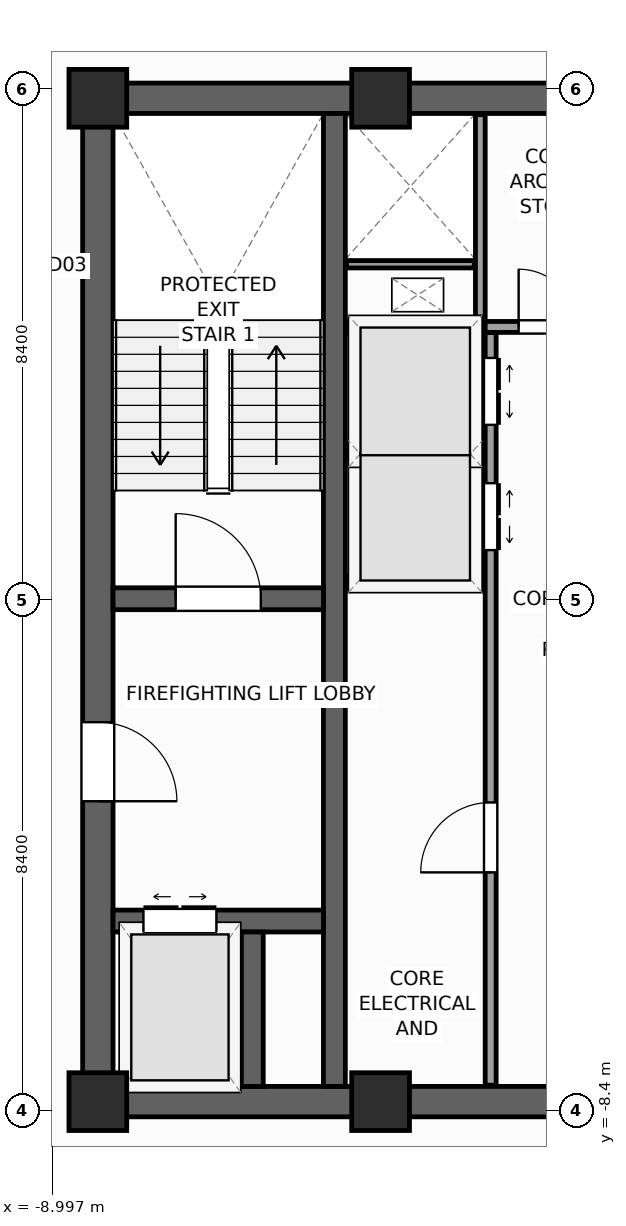
"""IFC4 building model, lengths in metres.
Left out: names, types, materials, properties, quantities, classifications, styles, units other than length and angle.
Written with IfcOpenShell. Run it as: python <this file> out.ifc"""

import sys

from ifc_helpers import new_model, si_unit, direction, frame, frame_2d, origin, origin_2d, place, context, subcontext, project, spatial, rectangle, extrude, source, transform, mapped, element, fill, save


model = new_model("IFC4")
c1 = context("Model", 3, precision=1e-05, world=origin(), true_north=direction((0.0, 1.0)))
c2 = subcontext(c1, "Body", "Model", "MODEL_VIEW")
j1 = project(units=[si_unit("LENGTHUNIT", "METRE"), si_unit("PLANEANGLEUNIT", "RADIAN")], contexts=[c1])
p1 = place(None, origin())
s1 = spatial("IfcSite", under=j1, at=p1, CompositionType="ELEMENT")
p2 = place(p1, origin())
s2 = spatial("IfcBuilding", under=s1, at=p2, CompositionType="ELEMENT")
p3 = place(p2, frame((0.0, 0.0, 248.5)))
s3 = spatial("IfcBuildingStorey", under=s2, at=p3, CompositionType="ELEMENT", Elevation=248.5)
p4 = place(p3, frame((-8.5, -8.25, 0.0), z_axis=(0.0, 0.0, 1.0), x_axis=(1.0, 0.0, 0.0)))
e1 = element("IfcWall", 1, at=p4, inside=s3, PredefinedType="SHEAR", context=c2, shape_type="SweptSolid", body=[
    extrude(rectangle(XDim=17.0, YDim=0.5, at=frame_2d((8.5, 0.0))), origin(), (0.0, 0.0, 1.0), 3.9),
])
p5 = place(p4, frame((7.85, 0.0, 0.0)))
e2 = element("IfcOpeningElement", 2, at=p5, cuts=e1, PredefinedType="OPENING", context=c2, shape_type="SweptSolid", body=[
    extrude(rectangle(XDim=1.3, YDim=2.2, at=frame_2d((0.65, 1.1))), frame((0.0, 0.26, 0.0), z_axis=(0.0, -1.0, 0.0), x_axis=(1.0, 0.0, 0.0)), (0.0, 0.0, 1.0), 0.52),
])
p6 = place(p3, frame((-8.5, 8.25, 0.0), z_axis=(0.0, 0.0, 1.0), x_axis=(1.0, 0.0, 0.0)))
e3 = element("IfcWall", 3, at=p6, inside=s3, PredefinedType="SHEAR", context=c2, shape_type="SweptSolid", body=[
    extrude(rectangle(XDim=17.0, YDim=0.5, at=frame_2d((8.5, 0.0))), origin(), (0.0, 0.0, 1.0), 3.9),
])
p7 = place(p3, frame((-8.25, -8.0, 0.0), z_axis=(0.0, 0.0, 1.0), x_axis=(0.0, 1.0, 0.0)))
e4 = element("IfcWall", 4, at=p7, inside=s3, PredefinedType="SHEAR", context=c2, shape_type="SweptSolid", body=[
    extrude(rectangle(XDim=16.0, YDim=0.5, at=frame_2d((8.0, 0.0))), origin(), (0.0, 0.0, 1.0), 3.9),
])
p8 = place(p7, frame((4.69, 0.0, 0.0)))
e5 = element("IfcOpeningElement", 5, at=p8, cuts=e4, PredefinedType="OPENING", context=c2, shape_type="SweptSolid", body=[
    extrude(rectangle(XDim=1.3, YDim=2.2, at=frame_2d((0.65, 1.1))), frame((0.0, 0.26, 0.0), z_axis=(0.0, -1.0, 0.0), x_axis=(1.0, 0.0, 0.0)), (0.0, 0.0, 1.0), 0.52),
])
p9 = place(p3, frame((-4.36, -8.0, 0.0), z_axis=(0.0, 0.0, 1.0), x_axis=(0.0, 1.0, 0.0)))
e6 = element("IfcWall", 6, at=p9, inside=s3, PredefinedType="SHEAR", context=c2, shape_type="SweptSolid", body=[
    extrude(rectangle(XDim=16.0, YDim=0.36, at=frame_2d((8.0, 0.0))), origin(), (0.0, 0.0, 1.0), 3.9),
])
p10 = place(p3, frame((-8.0, 0.02, 0.0), z_axis=(0.0, 0.0, 1.0), x_axis=(1.0, 0.0, 0.0)))
e7 = element("IfcWall", 7, at=p10, inside=s3, PredefinedType="SHEAR", context=c2, shape_type="SweptSolid", body=[
    extrude(rectangle(XDim=3.46, YDim=0.36, at=frame_2d((1.73, 0.0))), origin(), (0.0, 0.0, 1.0), 3.9),
])
p11 = place(p10, frame((1.03, 0.0, 0.0)))
e8 = element("IfcOpeningElement", 8, at=p11, cuts=e7, PredefinedType="OPENING", context=c2, shape_type="SweptSolid", body=[
    extrude(rectangle(XDim=1.4, YDim=2.2, at=frame_2d((0.7, 1.1))), frame((0.0, 0.19, 0.0), z_axis=(0.0, -1.0, 0.0), x_axis=(1.0, 0.0, 0.0)), (0.0, 0.0, 1.0), 0.38),
])
p12 = place(p3, frame((-8.0, -5.28, 0.0), z_axis=(0.0, 0.0, 1.0), x_axis=(1.0, 0.0, 0.0)))
e9 = element("IfcWall", 9, at=p12, inside=s3, PredefinedType="SHEAR", context=c2, shape_type="SweptSolid", body=[
    extrude(rectangle(XDim=3.46, YDim=0.36, at=frame_2d((1.73, 0.0))), origin(), (0.0, 0.0, 1.0), 3.9),
])
p13 = place(p12, frame((0.5, 0.0, 0.0)))
e10 = element("IfcOpeningElement", 10, at=p13, cuts=e9, PredefinedType="OPENING", context=c2, shape_type="SweptSolid", body=[
    extrude(rectangle(XDim=1.2, YDim=2.25, at=frame_2d((0.6, 1.125))), frame((0.0, 0.19, 0.0), z_axis=(0.0, -1.0, 0.0), x_axis=(1.0, 0.0, 0.0)), (0.0, 0.0, 1.0), 0.38),
])
p14 = place(p3, frame((-5.71, -8.0, 0.0), z_axis=(0.0, 0.0, 1.0), x_axis=(0.0, 1.0, 0.0)))
e11 = element("IfcWall", 11, at=p14, inside=s3, PredefinedType="SHEAR", context=c2, shape_type="SweptSolid", body=[
    extrude(rectangle(XDim=2.54, YDim=0.36, at=frame_2d((1.27, 0.0))), origin(), (0.0, 0.0, 1.0), 3.9),
])
m1 = source(origin(), c2, "Body", "SweptSolid", [
    extrude(rectangle(XDim=0.95, YDim=0.95, at=origin_2d()), origin(), (0.0, 0.0, 1.0), 3.9),
])
for number, where, z_axis, x_axis in (
    (12, (-8.25, -8.25, 0.0), (0.0, 0.0, 1.0), (1.0, 0.0, 0.0)),
    (13, (-8.25, 8.25, 0.0), (0.0, 0.0, 1.0), (1.0, 0.0, 0.0)),
    (14, (-3.6, -8.25, 0.0), (0.0, 0.0, 1.0), (1.0, 0.0, 0.0)),
    (15, (-3.6, 8.25, 0.0), (0.0, 0.0, 1.0), (1.0, 0.0, 0.0)),
):
    element("IfcColumn", number, at=place(p3, frame(where, z_axis=z_axis, x_axis=x_axis)), inside=s3, PredefinedType="PILASTER", context=c2, shape_type="MappedRepresentation", body=[
        mapped(m1, transform((0.0, 0.0, 0.0), scale=1.0)),
    ])
p15 = place(p3, frame((-6.733, 29.154, 0.0), z_axis=(0.0, 0.0, 1.0), x_axis=(-0.629325378072, -0.77714192302, 0.0)))
e16 = element("IfcWall", 16, at=p15, inside=s3, PredefinedType="STANDARD", context=c2, shape_type="SweptSolid", body=[
    extrude(rectangle(XDim=36.84, YDim=0.34, at=frame_2d((18.42, 0.0))), origin(), (0.0, 0.0, 1.0), 2.96),
])
p16 = place(p15, frame((12.295, 0.0, 0.0)))
e17 = element("IfcOpeningElement", 17, at=p16, cuts=e16, PredefinedType="OPENING", context=c2, shape_type="SweptSolid", body=[
    extrude(rectangle(XDim=1.05, YDim=2.25, at=frame_2d((0.525, 1.125))), frame((0.0, 0.18, 0.0), z_axis=(0.0, -1.0, 0.0), x_axis=(1.0, 0.0, 0.0)), (0.0, 0.0, 1.0), 0.36),
])
p17 = place(p15, frame((3.721, 0.0, 0.48)))
e18 = element("IfcOpeningElement", 18, at=p17, cuts=e16, PredefinedType="OPENING", context=c2, shape_type="SweptSolid", body=[
    extrude(rectangle(XDim=1.4, YDim=2.4, at=frame_2d((0.7, 1.2))), frame((0.0, 0.18, 0.0), z_axis=(0.0, -1.0, 0.0), x_axis=(1.0, 0.0, 0.0)), (0.0, 0.0, 1.0), 0.36),
])
p18 = place(p15, frame((9.059, 0.0, 0.58)))
e19 = element("IfcOpeningElement", 19, at=p18, cuts=e16, PredefinedType="OPENING", context=c2, shape_type="SweptSolid", body=[
    extrude(rectangle(XDim=1.75, YDim=2.3, at=frame_2d((0.875, 1.15))), frame((0.0, 0.18, 0.0), z_axis=(0.0, -1.0, 0.0), x_axis=(1.0, 0.0, 0.0)), (0.0, 0.0, 1.0), 0.36),
])
p19 = place(p15, frame((16.058, 0.0, 0.58)))
e20 = element("IfcOpeningElement", 20, at=p19, cuts=e16, PredefinedType="OPENING", context=c2, shape_type="SweptSolid", body=[
    extrude(rectangle(XDim=1.75, YDim=2.3, at=frame_2d((0.875, 1.15))), frame((0.0, 0.18, 0.0), z_axis=(0.0, -1.0, 0.0), x_axis=(1.0, 0.0, 0.0)), (0.0, 0.0, 1.0), 0.36),
])
p20 = place(p15, frame((24.176, 0.0, 0.58)))
e21 = element("IfcOpeningElement", 21, at=p20, cuts=e16, PredefinedType="OPENING", context=c2, shape_type="SweptSolid", body=[
    extrude(rectangle(XDim=1.75, YDim=2.3, at=frame_2d((0.875, 1.15))), frame((0.0, 0.18, 0.0), z_axis=(0.0, -1.0, 0.0), x_axis=(1.0, 0.0, 0.0)), (0.0, 0.0, 1.0), 0.36),
])
p21 = place(p15, frame((30.982, 0.0, 0.48)))
e22 = element("IfcOpeningElement", 22, at=p21, cuts=e16, PredefinedType="OPENING", context=c2, shape_type="SweptSolid", body=[
    extrude(rectangle(XDim=1.4, YDim=2.4, at=frame_2d((0.7, 1.2))), frame((0.0, 0.18, 0.0), z_axis=(0.0, -1.0, 0.0), x_axis=(1.0, 0.0, 0.0)), (0.0, 0.0, 1.0), 0.36),
])
p22 = place(p3, frame((-29.154, -6.733, 0.0), z_axis=(0.0, 0.0, 1.0), x_axis=(0.77714192302, -0.629325378072, 0.0)))
e23 = element("IfcWall", 23, at=p22, inside=s3, PredefinedType="STANDARD", context=c2, shape_type="SweptSolid", body=[
    extrude(rectangle(XDim=36.84, YDim=0.34, at=frame_2d((18.42, 0.0))), origin(), (0.0, 0.0, 1.0), 2.96),
])
p23 = place(p22, frame((3.721, 0.0, 0.48)))
e24 = element("IfcOpeningElement", 24, at=p23, cuts=e23, PredefinedType="OPENING", context=c2, shape_type="SweptSolid", body=[
    extrude(rectangle(XDim=1.4, YDim=2.4, at=frame_2d((0.7, 1.2))), frame((0.0, 0.18, 0.0), z_axis=(0.0, -1.0, 0.0), x_axis=(1.0, 0.0, 0.0)), (0.0, 0.0, 1.0), 0.36),
])
p24 = place(p22, frame((9.809, 0.0, 0.58)))
e25 = element("IfcOpeningElement", 25, at=p24, cuts=e23, PredefinedType="OPENING", context=c2, shape_type="SweptSolid", body=[
    extrude(rectangle(XDim=1.75, YDim=2.3, at=frame_2d((0.875, 1.15))), frame((0.0, 0.18, 0.0), z_axis=(0.0, -1.0, 0.0), x_axis=(1.0, 0.0, 0.0)), (0.0, 0.0, 1.0), 0.36),
])
p25 = place(p22, frame((16.058, 0.0, 0.58)))
e26 = element("IfcOpeningElement", 26, at=p25, cuts=e23, PredefinedType="OPENING", context=c2, shape_type="SweptSolid", body=[
    extrude(rectangle(XDim=1.75, YDim=2.3, at=frame_2d((0.875, 1.15))), frame((0.0, 0.18, 0.0), z_axis=(0.0, -1.0, 0.0), x_axis=(1.0, 0.0, 0.0)), (0.0, 0.0, 1.0), 0.36),
])
p26 = place(p22, frame((24.176, 0.0, 0.58)))
e27 = element("IfcOpeningElement", 27, at=p26, cuts=e23, PredefinedType="OPENING", context=c2, shape_type="SweptSolid", body=[
    extrude(rectangle(XDim=1.75, YDim=2.3, at=frame_2d((0.875, 1.15))), frame((0.0, 0.18, 0.0), z_axis=(0.0, -1.0, 0.0), x_axis=(1.0, 0.0, 0.0)), (0.0, 0.0, 1.0), 0.36),
])
p27 = place(p22, frame((30.232, 0.0, 0.48)))
e28 = element("IfcOpeningElement", 28, at=p27, cuts=e23, PredefinedType="OPENING", context=c2, shape_type="SweptSolid", body=[
    extrude(rectangle(XDim=1.4, YDim=2.4, at=frame_2d((0.7, 1.2))), frame((0.0, 0.18, 0.0), z_axis=(0.0, -1.0, 0.0), x_axis=(1.0, 0.0, 0.0)), (0.0, 0.0, 1.0), 0.36),
])
p28 = place(p3, frame((-1.79, -7.98, 0.0), z_axis=(0.0, 0.0, 1.0), x_axis=(0.0, 1.0, 0.0)))
e29 = element("IfcWall", 29, at=p28, inside=s3, PredefinedType="PARTITIONING", context=c2, shape_type="SweptSolid", body=[
    extrude(rectangle(XDim=12.38, YDim=0.18, at=frame_2d((6.19, 0.0))), origin(), (0.0, 0.0, 1.0), 3.66),
])
p29 = place(p28, frame((8.8, 0.0, 0.0)))
e30 = element("IfcOpeningElement", 30, at=p29, cuts=e29, PredefinedType="OPENING", context=c2, shape_type="SweptSolid", body=[
    extrude(rectangle(XDim=1.1, YDim=2.2, at=frame_2d((0.55, 1.1))), frame((0.0, 0.1, 0.0), z_axis=(0.0, -1.0, 0.0), x_axis=(1.0, 0.0, 0.0)), (0.0, 0.0, 1.0), 0.2),
])
p30 = place(p28, frame((10.86, 0.0, 0.0)))
e31 = element("IfcOpeningElement", 31, at=p30, cuts=e29, PredefinedType="OPENING", context=c2, shape_type="SweptSolid", body=[
    extrude(rectangle(XDim=1.1, YDim=2.2, at=frame_2d((0.55, 1.1))), frame((0.0, 0.1, 0.0), z_axis=(0.0, -1.0, 0.0), x_axis=(1.0, 0.0, 0.0)), (0.0, 0.0, 1.0), 0.2),
])
p31 = place(p28, frame((3.5, 0.0, 0.0)))
e32 = element("IfcOpeningElement", 32, at=p31, cuts=e29, PredefinedType="OPENING", context=c2, shape_type="SweptSolid", body=[
    extrude(rectangle(XDim=1.15, YDim=2.25, at=frame_2d((0.575, 1.125))), frame((0.0, 0.1, 0.0), z_axis=(0.0, -1.0, 0.0), x_axis=(1.0, 0.0, 0.0)), (0.0, 0.0, 1.0), 0.2),
])
p32 = place(p3, frame((-1.88, 4.49, 0.0), z_axis=(0.0, 0.0, 1.0), x_axis=(1.0, 0.0, 0.0)))
e33 = element("IfcWall", 33, at=p32, inside=s3, PredefinedType="PARTITIONING", context=c2, shape_type="SweptSolid", body=[
    extrude(rectangle(XDim=3.76, YDim=0.18, at=frame_2d((1.88, 0.0))), origin(), (0.0, 0.0, 1.0), 3.66),
])
p33 = place(p32, frame((0.55, 0.0, 0.0)))
e34 = element("IfcOpeningElement", 34, at=p33, cuts=e33, PredefinedType="OPENING", context=c2, shape_type="SweptSolid", body=[
    extrude(rectangle(XDim=0.95, YDim=2.1, at=frame_2d((0.475, 1.05))), frame((0.0, 0.1, 0.0), z_axis=(0.0, -1.0, 0.0), x_axis=(1.0, 0.0, 0.0)), (0.0, 0.0, 1.0), 0.2),
])
p34 = place(p32, frame((2.56, 0.0, 0.0)))
e35 = element("IfcOpeningElement", 35, at=p34, cuts=e33, PredefinedType="OPENING", context=c2, shape_type="SweptSolid", body=[
    extrude(rectangle(XDim=0.88, YDim=2.1, at=frame_2d((0.44, 1.05))), frame((0.0, 0.1, 0.0), z_axis=(0.0, -1.0, 0.0), x_axis=(1.0, 0.0, 0.0)), (0.0, 0.0, 1.0), 0.2),
])
for number, where, z_axis, x_axis in (
    (36, (-4.17, 0.3, 0.0), (0.0, 0.0, 1.0), (1.0, 0.0, 0.0)),
    (37, (-4.17, 4.49, 0.0), (0.0, 0.0, 1.0), (1.0, 0.0, 0.0)),
):
    element("IfcWall", number, at=place(p3, frame(where, z_axis=z_axis, x_axis=x_axis)), inside=s3, PredefinedType="PARTITIONING", context=c2, shape_type="SweptSolid", body=[
        extrude(rectangle(XDim=2.28, YDim=0.18, at=frame_2d((1.14, 0.0))), origin(), (0.0, 0.0, 1.0), 3.66),
    ])
p35 = place(p3, frame((-4.16, 2.4, 0.0), z_axis=(0.0, 0.0, 1.0), x_axis=(1.0, 0.0, 0.0)))
e38 = element("IfcWall", 38, at=p35, inside=s3, PredefinedType="PARTITIONING", context=c2, shape_type="SweptSolid", body=[
    extrude(rectangle(XDim=2.26, YDim=0.12, at=frame_2d((1.13, 0.0))), origin(), (0.0, 0.0, 1.0), 3.66),
])
p36 = place(p3, frame((-1.96, 4.58, 0.0), z_axis=(0.0, 0.0, 1.0), x_axis=(0.0, 1.0, 0.0)))
e39 = element("IfcWall", 39, at=p36, inside=s3, PredefinedType="PARTITIONING", context=c2, shape_type="SweptSolid", body=[
    extrude(rectangle(XDim=3.4, YDim=0.16, at=frame_2d((1.7, 0.0))), origin(), (0.0, 0.0, 1.0), 3.66),
])
p37 = place(p3, frame((-4.16, 5.52, 0.0), z_axis=(0.0, 0.0, 1.0), x_axis=(1.0, 0.0, 0.0)))
e40 = element("IfcWall", 40, at=p37, inside=s3, PredefinedType="PARTITIONING", context=c2, shape_type="SweptSolid", body=[
    extrude(rectangle(XDim=2.1, YDim=0.12, at=frame_2d((1.05, 0.0))), origin(), (0.0, 0.0, 1.0), 3.66),
])
m2 = source(origin(), c2, "Body", "SweptSolid", [
    extrude(rectangle(XDim=1.4, YDim=2.2, at=frame_2d((0.7, 1.1))), frame((0.0, 0.025, 0.0), z_axis=(0.0, -1.0, 0.0), x_axis=(1.0, 0.0, 0.0)), (0.0, 0.0, 1.0), 0.05),
])
p38 = place(p11, origin())
e41 = element("IfcDoor", 41, at=p38, inside=s3, OperationType="SINGLE_SWING_LEFT", PredefinedType="DOOR", context=c2, shape_type="MappedRepresentation", body=[
    mapped(m2, transform((0.0, 0.0, 0.0), scale=1.0)),
])
fill(e8, e41)
m3 = source(origin(), c2, "Body", "SweptSolid", [
    extrude(rectangle(XDim=1.3, YDim=2.2, at=frame_2d((0.65, 1.1))), frame((0.0, 0.025, 0.0), z_axis=(0.0, -1.0, 0.0), x_axis=(1.0, 0.0, 0.0)), (0.0, 0.0, 1.0), 0.05),
])
p39 = place(p8, frame((1.3, 0.0, 0.0), z_axis=(0.0, 0.0, 1.0), x_axis=(-1.0, 0.0, 0.0)))
e42 = element("IfcDoor", 42, at=p39, inside=s3, OperationType="SINGLE_SWING_LEFT", PredefinedType="DOOR", context=c2, shape_type="MappedRepresentation", body=[
    mapped(m3, transform((0.0, 0.0, 0.0), scale=1.0)),
])
fill(e5, e42)
m4 = source(origin(), c2, "Body", "SweptSolid", [
    extrude(rectangle(XDim=1.2, YDim=2.25, at=frame_2d((0.6, 1.125))), frame((0.0, 0.025, 0.0), z_axis=(0.0, -1.0, 0.0), x_axis=(1.0, 0.0, 0.0)), (0.0, 0.0, 1.0), 0.05),
])
p40 = place(p13, origin())
e43 = element("IfcDoor", 43, at=p40, inside=s3, OperationType="DOUBLE_DOOR_SLIDING", PredefinedType="DOOR", context=c2, shape_type="MappedRepresentation", body=[
    mapped(m4, transform((0.0, 0.0, 0.0), scale=1.0)),
])
fill(e10, e43)
m5 = source(origin(), c2, "Body", "SweptSolid", [
    extrude(rectangle(XDim=1.1, YDim=2.2, at=frame_2d((0.55, 1.1))), frame((0.0, 0.025, 0.0), z_axis=(0.0, -1.0, 0.0), x_axis=(1.0, 0.0, 0.0)), (0.0, 0.0, 1.0), 0.05),
])
p41 = place(p29, frame((1.1, 0.0, 0.0), z_axis=(0.0, 0.0, 1.0), x_axis=(-1.0, 0.0, 0.0)))
e44 = element("IfcDoor", 44, at=p41, inside=s3, OperationType="DOUBLE_DOOR_SLIDING", PredefinedType="DOOR", context=c2, shape_type="MappedRepresentation", body=[
    mapped(m5, transform((0.0, 0.0, 0.0), scale=1.0)),
])
fill(e30, e44)
p42 = place(p30, frame((1.1, 0.0, 0.0), z_axis=(0.0, 0.0, 1.0), x_axis=(-1.0, 0.0, 0.0)))
e45 = element("IfcDoor", 45, at=p42, inside=s3, OperationType="DOUBLE_DOOR_SLIDING", PredefinedType="DOOR", context=c2, shape_type="MappedRepresentation", body=[
    mapped(m5, transform((0.0, 0.0, 0.0), scale=1.0)),
])
fill(e31, e45)
m6 = source(origin(), c2, "Body", "SweptSolid", [
    extrude(rectangle(XDim=1.15, YDim=2.25, at=frame_2d((0.575, 1.125))), frame((0.0, 0.025, 0.0), z_axis=(0.0, -1.0, 0.0), x_axis=(1.0, 0.0, 0.0)), (0.0, 0.0, 1.0), 0.05),
])
p43 = place(p31, origin())
e46 = element("IfcDoor", 46, at=p43, inside=s3, OperationType="SINGLE_SWING_LEFT", PredefinedType="DOOR", context=c2, shape_type="MappedRepresentation", body=[
    mapped(m6, transform((0.0, 0.0, 0.0), scale=1.0)),
])
fill(e32, e46)
m7 = source(origin(), c2, "Body", "SweptSolid", [
    extrude(rectangle(XDim=0.95, YDim=2.1, at=frame_2d((0.475, 1.05))), frame((0.0, 0.025, 0.0), z_axis=(0.0, -1.0, 0.0), x_axis=(1.0, 0.0, 0.0)), (0.0, 0.0, 1.0), 0.05),
])
p44 = place(p33, origin())
e47 = element("IfcDoor", 47, at=p44, inside=s3, OperationType="SINGLE_SWING_LEFT", PredefinedType="DOOR", context=c2, shape_type="MappedRepresentation", body=[
    mapped(m7, transform((0.0, 0.0, 0.0), scale=1.0)),
])
fill(e34, e47)
save(model, sys.argv[1])
